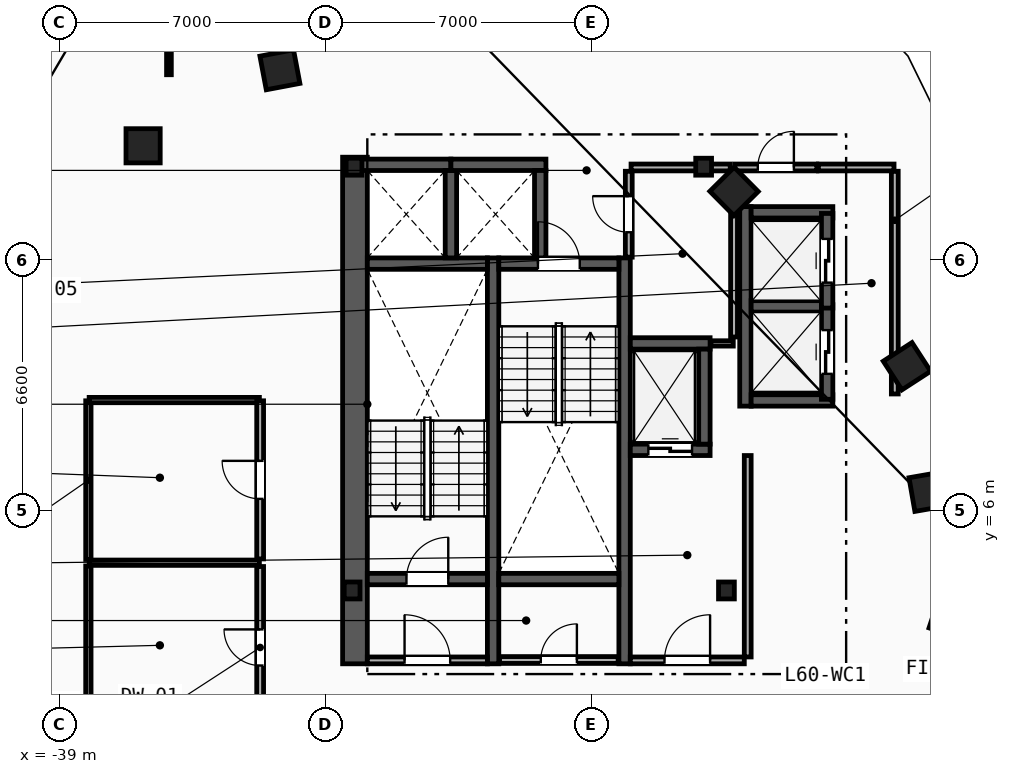
"""IFC4 building model, lengths in metres.
Left out: names, types, materials, properties, quantities, classifications, styles, units other than length and angle.
Written with IfcOpenShell. Run it as: python <this file> out.ifc"""

import sys

from ifc_helpers import new_model, si_unit, direction, frame, frame_2d, origin, origin_2d, place, context, subcontext, project, spatial, rectangle, i_section, extrude, element, fill, save


model = new_model("IFC4")
c1 = context("Model", 3, precision=1e-05, world=origin(), true_north=direction((0.0, 1.0)))
c2 = subcontext(c1, "Body", "Model", "MODEL_VIEW")
j1 = project(units=[si_unit("LENGTHUNIT", "METRE"), si_unit("PLANEANGLEUNIT", "RADIAN")], contexts=[c1])
p1 = place(None, origin())
s1 = spatial("IfcSite", under=j1, at=p1, CompositionType="ELEMENT")
p2 = place(p1, origin())
s2 = spatial("IfcBuilding", under=s1, at=p2, CompositionType="ELEMENT")
p3 = place(p2, frame((0.0, 0.0, 227.8)))
s3 = spatial("IfcBuildingStorey", under=s2, at=p3, CompositionType="ELEMENT", Elevation=227.8)
for number, where, z_axis, x_axis in (
    (1, (-31.3, 3.9, 0.0), (0.0, 0.0, 1.0), (1.0, 0.0, 0.0)),
    (2, (-21.45, 3.9, 0.0), (0.0, 0.0, 1.0), (1.0, 0.0, 0.0)),
    (3, (-22.05, 15.05, 0.0), (0.0, 0.0, 1.0), (1.0, 0.0, 0.0)),
    (4, (-31.25, 15.05, 0.0), (0.0, 0.0, 1.0), (1.0, 0.0, 0.0)),
):
    element("IfcColumn", number, at=place(p3, frame(where, z_axis=z_axis, x_axis=x_axis)), inside=s3, PredefinedType="COLUMN", context=c2, shape_type="SweptSolid", body=[
        extrude(i_section(OverallWidth=0.416, OverallDepth=0.446, WebThickness=0.039, FlangeThickness=0.063, FilletRadius=0.018, at=origin_2d()), origin(), (0.0, 0.0, 1.0), 3.6),
    ])
for number, where, z_axis, x_axis in (
    (5, (-36.8, 15.6, 0.0), (0.0, 0.0, 1.0), (1.0, 0.0, 0.0)),
    (6, (-15.55, 3.2, 0.0), (0.0, 0.0, 1.0), (0.315, 0.949, 0.0)),
    (7, (-16.125, 6.5, 0.0), (0.0, 0.0, 1.0), (-0.172, 0.985, 0.0)),
    (8, (-16.7, 9.8, 0.0), (0.0, 0.0, 1.0), (-0.544, 0.839, 0.0)),
    (9, (-21.25, 14.4, 0.0), (0.0, 0.0, 1.0), (-0.703, 0.711, 0.0)),
    (10, (-33.2, 17.6, 0.0), (0.0, 0.0, 1.0), (-0.983, -0.186, 0.0)),
):
    element("IfcColumn", number, at=place(p3, frame(where, z_axis=z_axis, x_axis=x_axis)), inside=s3, PredefinedType="COLUMN", context=c2, shape_type="SweptSolid", body=[
        extrude(rectangle(XDim=0.9, YDim=0.9, at=origin_2d()), origin(), (0.0, 0.0, 1.0), 3.6),
    ])
p4 = place(p3, frame((-31.225, 1.97, 0.0), z_axis=(0.0, 0.0, 1.0), x_axis=(0.0, 1.0, 0.0)))
e11 = element("IfcWall", 11, at=p4, inside=s3, PredefinedType="SHEAR", context=c2, shape_type="SweptSolid", body=[
    extrude(rectangle(XDim=13.33, YDim=0.65, at=frame_2d((6.665, 0.0))), origin(), (0.0, 0.0, 1.0), 3.34),
])
for number, where, z_axis, x_axis in (
    (12, (-27.59, 1.97, 0.0), (0.0, 0.0, 1.0), (0.0, 1.0, 0.0)),
    (13, (-24.13, 1.97, 0.0), (0.0, 0.0, 1.0), (0.0, 1.0, 0.0)),
):
    element("IfcWall", number, at=place(p3, frame(where, z_axis=z_axis, x_axis=x_axis)), inside=s3, PredefinedType="SHEAR", context=c2, shape_type="SweptSolid", body=[
        extrude(rectangle(XDim=10.68, YDim=0.3, at=frame_2d((5.34, 0.0))), origin(), (0.0, 0.0, 1.0), 3.34),
    ])
p5 = place(p3, frame((-30.9, 4.2, 0.0), z_axis=(0.0, 0.0, 1.0), x_axis=(1.0, 0.0, 0.0)))
e14 = element("IfcWall", 14, at=p5, inside=s3, PredefinedType="SHEAR", context=c2, shape_type="SweptSolid", body=[
    extrude(rectangle(XDim=3.16, YDim=0.3, at=frame_2d((1.58, 0.0))), origin(), (0.0, 0.0, 1.0), 3.34),
])
p6 = place(p5, frame((1.03, 0.0, 0.0)))
e15 = element("IfcOpeningElement", 15, at=p6, cuts=e14, PredefinedType="OPENING", context=c2, shape_type="SweptSolid", body=[
    extrude(rectangle(XDim=1.1, YDim=2.15, at=frame_2d((0.55, 1.075))), frame((0.0, 0.16, 0.0), z_axis=(0.0, -1.0, 0.0), x_axis=(1.0, 0.0, 0.0)), (0.0, 0.0, 1.0), 0.32),
])
p7 = place(p3, frame((-30.9, 12.5, 0.0), z_axis=(0.0, 0.0, 1.0), x_axis=(1.0, 0.0, 0.0)))
e16 = element("IfcWall", 16, at=p7, inside=s3, PredefinedType="SHEAR", context=c2, shape_type="SweptSolid", body=[
    extrude(rectangle(XDim=3.16, YDim=0.3, at=frame_2d((1.58, 0.0))), origin(), (0.0, 0.0, 1.0), 3.34),
])
p8 = place(p3, frame((-27.44, 12.5, 0.0), z_axis=(0.0, 0.0, 1.0), x_axis=(1.0, 0.0, 0.0)))
e17 = element("IfcWall", 17, at=p8, inside=s3, PredefinedType="SHEAR", context=c2, shape_type="SweptSolid", body=[
    extrude(rectangle(XDim=3.16, YDim=0.3, at=frame_2d((1.58, 0.0))), origin(), (0.0, 0.0, 1.0), 3.34),
])
p9 = place(p8, frame((1.03, 0.0, 0.0)))
e18 = element("IfcOpeningElement", 18, at=p9, cuts=e17, PredefinedType="OPENING", context=c2, shape_type="SweptSolid", body=[
    extrude(rectangle(XDim=1.1, YDim=2.15, at=frame_2d((0.55, 1.075))), frame((0.0, 0.16, 0.0), z_axis=(0.0, -1.0, 0.0), x_axis=(1.0, 0.0, 0.0)), (0.0, 0.0, 1.0), 0.32),
])
p10 = place(p3, frame((-27.44, 4.2, 0.0), z_axis=(0.0, 0.0, 1.0), x_axis=(1.0, 0.0, 0.0)))
e19 = element("IfcWall", 19, at=p10, inside=s3, PredefinedType="SHEAR", context=c2, shape_type="SweptSolid", body=[
    extrude(rectangle(XDim=3.16, YDim=0.3, at=frame_2d((1.58, 0.0))), origin(), (0.0, 0.0, 1.0), 3.34),
])
p11 = place(p3, frame((-20.89, 2.15, 0.0), z_axis=(0.0, 0.0, 1.0), x_axis=(0.0, 1.0, 0.0)))
e20 = element("IfcWall", 20, at=p11, inside=s3, PredefinedType="PARTITIONING", context=c2, shape_type="SweptSolid", body=[
    extrude(rectangle(XDim=5.3, YDim=0.18, at=frame_2d((2.65, 0.0))), origin(), (0.0, 0.0, 1.0), 3.34),
])
p12 = place(p3, frame((-23.98, 2.06, 0.0), z_axis=(0.0, 0.0, 1.0), x_axis=(1.0, 0.0, 0.0)))
e21 = element("IfcWall", 21, at=p12, inside=s3, PredefinedType="PARTITIONING", context=c2, shape_type="SweptSolid", body=[
    extrude(rectangle(XDim=3.0, YDim=0.18, at=frame_2d((1.5, 0.0))), origin(), (0.0, 0.0, 1.0), 3.34),
])
p13 = place(p12, frame((0.9, 0.0, 0.0)))
e22 = element("IfcOpeningElement", 22, at=p13, cuts=e21, PredefinedType="OPENING", context=c2, shape_type="SweptSolid", body=[
    extrude(rectangle(XDim=1.2, YDim=2.15, at=frame_2d((0.6, 1.075))), frame((0.0, 0.1, 0.0), z_axis=(0.0, -1.0, 0.0), x_axis=(1.0, 0.0, 0.0)), (0.0, 0.0, 1.0), 0.2),
])
p14 = place(p3, frame((-30.9, 2.06, 0.0), z_axis=(0.0, 0.0, 1.0), x_axis=(1.0, 0.0, 0.0)))
e23 = element("IfcWall", 23, at=p14, inside=s3, PredefinedType="PARTITIONING", context=c2, shape_type="SweptSolid", body=[
    extrude(rectangle(XDim=3.16, YDim=0.18, at=frame_2d((1.58, 0.0))), origin(), (0.0, 0.0, 1.0), 3.34),
])
p15 = place(p14, frame((0.98, 0.0, 0.0)))
e24 = element("IfcOpeningElement", 24, at=p15, cuts=e23, PredefinedType="OPENING", context=c2, shape_type="SweptSolid", body=[
    extrude(rectangle(XDim=1.2, YDim=2.15, at=frame_2d((0.6, 1.075))), frame((0.0, 0.1, 0.0), z_axis=(0.0, -1.0, 0.0), x_axis=(1.0, 0.0, 0.0)), (0.0, 0.0, 1.0), 0.2),
])
p16 = place(p3, frame((-23.98, 7.6, 0.0), z_axis=(0.0, 0.0, 1.0), x_axis=(1.0, 0.0, 0.0)))
e25 = element("IfcWall", 25, at=p16, inside=s3, PredefinedType="SHEAR", context=c2, shape_type="SweptSolid", body=[
    extrude(rectangle(XDim=2.1, YDim=0.3, at=frame_2d((1.05, 0.0))), origin(), (0.0, 0.0, 1.0), 3.34),
])
p17 = place(p16, frame((0.475, 0.0, 0.0)))
e26 = element("IfcOpeningElement", 26, at=p17, cuts=e25, PredefinedType="OPENING", context=c2, shape_type="SweptSolid", body=[
    extrude(rectangle(XDim=1.15, YDim=2.2, at=frame_2d((0.575, 1.1))), frame((0.0, 0.16, 0.0), z_axis=(0.0, -1.0, 0.0), x_axis=(1.0, 0.0, 0.0)), (0.0, 0.0, 1.0), 0.32),
])
p18 = place(p3, frame((-23.98, 10.4, 0.0), z_axis=(0.0, 0.0, 1.0), x_axis=(1.0, 0.0, 0.0)))
e27 = element("IfcWall", 27, at=p18, inside=s3, PredefinedType="SHEAR", context=c2, shape_type="SweptSolid", body=[
    extrude(rectangle(XDim=2.1, YDim=0.3, at=frame_2d((1.05, 0.0))), origin(), (0.0, 0.0, 1.0), 3.34),
])
for number, where, z_axis, x_axis in (
    (28, (-22.03, 7.75, 0.0), (0.0, 0.0, 1.0), (0.0, 1.0, 0.0)),
    (29, (-31.2, 15.1, 0.0), (0.0, 0.0, 1.0), (1.0, 0.0, 0.0)),
):
    element("IfcWall", number, at=place(p3, frame(where, z_axis=z_axis, x_axis=x_axis)), inside=s3, PredefinedType="SHEAR", context=c2, shape_type="SweptSolid", body=[
        extrude(rectangle(XDim=2.5, YDim=0.3, at=frame_2d((1.25, 0.0))), origin(), (0.0, 0.0, 1.0), 3.34),
    ])
p19 = place(p3, frame((-28.7, 12.65, 0.0), z_axis=(0.0, 0.0, 1.0), x_axis=(0.0, 1.0, 0.0)))
e30 = element("IfcWall", 30, at=p19, inside=s3, PredefinedType="SHEAR", context=c2, shape_type="SweptSolid", body=[
    extrude(rectangle(XDim=2.3, YDim=0.3, at=frame_2d((1.15, 0.0))), origin(), (0.0, 0.0, 1.0), 3.34),
])
p20 = place(p3, frame((-28.7, 15.1, 0.0), z_axis=(0.0, 0.0, 1.0), x_axis=(1.0, 0.0, 0.0)))
e31 = element("IfcWall", 31, at=p20, inside=s3, PredefinedType="SHEAR", context=c2, shape_type="SweptSolid", body=[
    extrude(rectangle(XDim=2.5, YDim=0.3, at=frame_2d((1.25, 0.0))), origin(), (0.0, 0.0, 1.0), 3.34),
])
p21 = place(p3, frame((-26.35, 12.65, 0.0), z_axis=(0.0, 0.0, 1.0), x_axis=(0.0, 1.0, 0.0)))
e32 = element("IfcWall", 32, at=p21, inside=s3, PredefinedType="SHEAR", context=c2, shape_type="SweptSolid", body=[
    extrude(rectangle(XDim=2.3, YDim=0.3, at=frame_2d((1.15, 0.0))), origin(), (0.0, 0.0, 1.0), 3.34),
])
p22 = place(p3, frame((-20.95, 8.75, 0.0), z_axis=(0.0, 0.0, 1.0), x_axis=(0.0, 1.0, 0.0)))
e33 = element("IfcWall", 33, at=p22, inside=s3, PredefinedType="SHEAR", context=c2, shape_type="SweptSolid", body=[
    extrude(rectangle(XDim=5.25, YDim=0.3, at=frame_2d((2.625, 0.0))), origin(), (0.0, 0.0, 1.0), 3.34),
])
for number, where, z_axis, x_axis in (
    (34, (-20.8, 8.9, 0.0), (0.0, 0.0, 1.0), (1.0, 0.0, 0.0)),
    (35, (-20.8, 13.85, 0.0), (0.0, 0.0, 1.0), (1.0, 0.0, 0.0)),
):
    element("IfcWall", number, at=place(p3, frame(where, z_axis=z_axis, x_axis=x_axis)), inside=s3, PredefinedType="SHEAR", context=c2, shape_type="SweptSolid", body=[
        extrude(rectangle(XDim=2.15, YDim=0.3, at=frame_2d((1.075, 0.0))), origin(), (0.0, 0.0, 1.0), 3.34),
    ])
p23 = place(p3, frame((-20.8, 11.375, 0.0), z_axis=(0.0, 0.0, 1.0), x_axis=(1.0, 0.0, 0.0)))
e36 = element("IfcWall", 36, at=p23, inside=s3, PredefinedType="SHEAR", context=c2, shape_type="SweptSolid", body=[
    extrude(rectangle(XDim=1.85, YDim=0.3, at=frame_2d((0.925, 0.0))), origin(), (0.0, 0.0, 1.0), 3.34),
])
p24 = place(p3, frame((-18.8, 8.93, 0.0), z_axis=(0.0, 0.0, 1.0), x_axis=(0.0, 1.0, 0.0)))
e37 = element("IfcWall", 37, at=p24, inside=s3, PredefinedType="SHEAR", context=c2, shape_type="SweptSolid", body=[
    extrude(rectangle(XDim=2.49, YDim=0.3, at=frame_2d((1.245, 0.0))), origin(), (0.0, 0.0, 1.0), 3.34),
])
p25 = place(p24, frame((0.67, 0.0, 0.0)))
e38 = element("IfcOpeningElement", 38, at=p25, cuts=e37, PredefinedType="OPENING", context=c2, shape_type="SweptSolid", body=[
    extrude(rectangle(XDim=1.15, YDim=2.2, at=frame_2d((0.575, 1.1))), frame((0.0, 0.16, 0.0), z_axis=(0.0, -1.0, 0.0), x_axis=(1.0, 0.0, 0.0)), (0.0, 0.0, 1.0), 0.32),
])
p26 = place(p3, frame((-18.8, 11.33, 0.0), z_axis=(0.0, 0.0, 1.0), x_axis=(0.0, 1.0, 0.0)))
e39 = element("IfcWall", 39, at=p26, inside=s3, PredefinedType="SHEAR", context=c2, shape_type="SweptSolid", body=[
    extrude(rectangle(XDim=2.49, YDim=0.3, at=frame_2d((1.245, 0.0))), origin(), (0.0, 0.0, 1.0), 3.34),
])
p27 = place(p26, frame((0.67, 0.0, 0.0)))
e40 = element("IfcOpeningElement", 40, at=p27, cuts=e39, PredefinedType="OPENING", context=c2, shape_type="SweptSolid", body=[
    extrude(rectangle(XDim=1.15, YDim=2.2, at=frame_2d((0.575, 1.1))), frame((0.0, 0.16, 0.0), z_axis=(0.0, -1.0, 0.0), x_axis=(1.0, 0.0, 0.0)), (0.0, 0.0, 1.0), 0.32),
])
p28 = place(p3, frame((-17.02, 9.07, 0.0), z_axis=(0.0, 0.0, 1.0), x_axis=(0.0, 1.0, 0.0)))
e41 = element("IfcWall", 41, at=p28, inside=s3, PredefinedType="PARTITIONING", context=c2, shape_type="SweptSolid", body=[
    extrude(rectangle(XDim=5.86, YDim=0.18, at=frame_2d((2.93, 0.0))), origin(), (0.0, 0.0, 1.0), 3.34),
])
p29 = place(p3, frame((-21.23, 15.03, 0.0), z_axis=(0.0, 0.0, 1.0), x_axis=(1.0, 0.0, 0.0)))
e42 = element("IfcWall", 42, at=p29, inside=s3, PredefinedType="PARTITIONING", context=c2, shape_type="SweptSolid", body=[
    extrude(rectangle(XDim=2.16, YDim=0.18, at=frame_2d((1.08, 0.0))), origin(), (0.0, 0.0, 1.0), 3.34),
])
p30 = place(p29, frame((0.605, 0.0, 0.0)))
e43 = element("IfcOpeningElement", 43, at=p30, cuts=e42, PredefinedType="OPENING", context=c2, shape_type="SweptSolid", body=[
    extrude(rectangle(XDim=0.95, YDim=2.1, at=frame_2d((0.475, 1.05))), frame((0.0, 0.1, 0.0), z_axis=(0.0, -1.0, 0.0), x_axis=(1.0, 0.0, 0.0)), (0.0, 0.0, 1.0), 0.2),
])
p31 = place(p3, frame((-19.03, 15.03, 0.0), z_axis=(0.0, 0.0, 1.0), x_axis=(1.0, 0.0, 0.0)))
e44 = element("IfcWall", 44, at=p31, inside=s3, PredefinedType="PARTITIONING", context=c2, shape_type="SweptSolid", body=[
    extrude(rectangle(XDim=1.99, YDim=0.18, at=frame_2d((0.995, 0.0))), origin(), (0.0, 0.0, 1.0), 3.34),
])
p32 = place(p3, frame((-21.86, 10.4, 0.0), z_axis=(0.0, 0.0, 1.0), x_axis=(1.0, 0.0, 0.0)))
e45 = element("IfcWall", 45, at=p32, inside=s3, PredefinedType="PARTITIONING", context=c2, shape_type="SweptSolid", body=[
    extrude(rectangle(XDim=0.59, YDim=0.14, at=frame_2d((0.295, 0.0))), origin(), (0.0, 0.0, 1.0), 3.34),
])
p33 = place(p3, frame((-21.25, 10.57, 0.0), z_axis=(0.0, 0.0, 1.0), x_axis=(0.0, 1.0, 0.0)))
e46 = element("IfcWall", 46, at=p33, inside=s3, PredefinedType="PARTITIONING", context=c2, shape_type="SweptSolid", body=[
    extrude(rectangle(XDim=4.36, YDim=0.18, at=frame_2d((2.18, 0.0))), origin(), (0.0, 0.0, 1.0), 3.34),
])
p34 = place(p3, frame((-23.96, 15.03, 0.0), z_axis=(0.0, 0.0, 1.0), x_axis=(1.0, 0.0, 0.0)))
e47 = element("IfcWall", 47, at=p34, inside=s3, PredefinedType="PARTITIONING", context=c2, shape_type="SweptSolid", body=[
    extrude(rectangle(XDim=2.61, YDim=0.18, at=frame_2d((1.305, 0.0))), origin(), (0.0, 0.0, 1.0), 2.413),
])
p35 = place(p3, frame((-27.42, 2.07, 0.0), z_axis=(0.0, 0.0, 1.0), x_axis=(1.0, 0.0, 0.0)))
e48 = element("IfcWall", 48, at=p35, inside=s3, PredefinedType="PARTITIONING", context=c2, shape_type="SweptSolid", body=[
    extrude(rectangle(XDim=3.12, YDim=0.18, at=frame_2d((1.56, 0.0))), origin(), (0.0, 0.0, 1.0), 3.34),
])
p36 = place(p35, frame((1.085, 0.0, 0.0)))
e49 = element("IfcOpeningElement", 49, at=p36, cuts=e48, PredefinedType="OPENING", context=c2, shape_type="SweptSolid", body=[
    extrude(rectangle(XDim=0.95, YDim=2.1, at=frame_2d((0.475, 1.05))), frame((0.0, 0.1, 0.0), z_axis=(0.0, -1.0, 0.0), x_axis=(1.0, 0.0, 0.0)), (0.0, 0.0, 1.0), 0.2),
])
p37 = place(p3, frame((-24.02, 12.67, 0.0), z_axis=(0.0, 0.0, 1.0), x_axis=(0.0, 1.0, 0.0)))
e50 = element("IfcWall", 50, at=p37, inside=s3, PredefinedType="PARTITIONING", context=c2, shape_type="SweptSolid", body=[
    extrude(rectangle(XDim=2.26, YDim=0.18, at=frame_2d((1.13, 0.0))), origin(), (0.0, 0.0, 1.0), 3.34),
])
p38 = place(p37, frame((0.655, 0.0, 0.0)))
e51 = element("IfcOpeningElement", 51, at=p38, cuts=e50, PredefinedType="OPENING", context=c2, shape_type="SweptSolid", body=[
    extrude(rectangle(XDim=0.95, YDim=2.1, at=frame_2d((0.475, 1.05))), frame((0.0, 0.1, 0.0), z_axis=(0.0, -1.0, 0.0), x_axis=(1.0, 0.0, 0.0)), (0.0, 0.0, 1.0), 0.2),
])
p39 = place(p3, frame((-38.24, 0.27, 0.0), z_axis=(0.0, 0.0, 1.0), x_axis=(0.0, 1.0, 0.0)))
e52 = element("IfcWall", 52, at=p39, inside=s3, PredefinedType="PARTITIONING", context=c2, shape_type="SweptSolid", body=[
    extrude(rectangle(XDim=4.275, YDim=0.14, at=frame_2d((2.137, 0.0))), origin(), (0.0, 0.0, 1.0), 3.34),
])
p40 = place(p3, frame((-38.24, 4.715, 0.0), z_axis=(0.0, 0.0, 1.0), x_axis=(0.0, 1.0, 0.0)))
e53 = element("IfcWall", 53, at=p40, inside=s3, PredefinedType="PARTITIONING", context=c2, shape_type="SweptSolid", body=[
    extrude(rectangle(XDim=4.175, YDim=0.14, at=frame_2d((2.087, 0.0))), origin(), (0.0, 0.0, 1.0), 3.34),
])
for number, where, z_axis, x_axis in (
    (54, (-38.22, 4.63, 0.0), (0.0, 0.0, 1.0), (1.0, 0.0, 0.0)),
    (55, (-38.22, 8.91, 0.0), (0.0, 0.0, 1.0), (1.0, 0.0, 0.0)),
):
    element("IfcWall", number, at=place(p3, frame(where, z_axis=z_axis, x_axis=x_axis)), inside=s3, PredefinedType="PARTITIONING", context=c2, shape_type="SweptSolid", body=[
        extrude(rectangle(XDim=4.48, YDim=0.14, at=frame_2d((2.24, 0.0))), origin(), (0.0, 0.0, 1.0), 3.34),
    ])
p41 = place(p3, frame((-33.72, 0.27, 0.0), z_axis=(0.0, 0.0, 1.0), x_axis=(0.0, 1.0, 0.0)))
e56 = element("IfcWall", 56, at=p41, inside=s3, PredefinedType="PARTITIONING", context=c2, shape_type="SweptSolid", body=[
    extrude(rectangle(XDim=4.26, YDim=0.18, at=frame_2d((2.13, 0.0))), origin(), (0.0, 0.0, 1.0), 3.34),
])
p42 = place(p41, frame((1.655, 0.0, 0.0)))
e57 = element("IfcOpeningElement", 57, at=p42, cuts=e56, PredefinedType="OPENING", context=c2, shape_type="SweptSolid", body=[
    extrude(rectangle(XDim=0.95, YDim=2.1, at=frame_2d((0.475, 1.05))), frame((0.0, 0.1, 0.0), z_axis=(0.0, -1.0, 0.0), x_axis=(1.0, 0.0, 0.0)), (0.0, 0.0, 1.0), 0.2),
])
p43 = place(p3, frame((-33.72, 4.73, 0.0), z_axis=(0.0, 0.0, 1.0), x_axis=(0.0, 1.0, 0.0)))
e58 = element("IfcWall", 58, at=p43, inside=s3, PredefinedType="PARTITIONING", context=c2, shape_type="SweptSolid", body=[
    extrude(rectangle(XDim=4.16, YDim=0.18, at=frame_2d((2.08, 0.0))), origin(), (0.0, 0.0, 1.0), 3.34),
])
p44 = place(p43, frame((1.58, 0.0, 0.0)))
e59 = element("IfcOpeningElement", 59, at=p44, cuts=e58, PredefinedType="OPENING", context=c2, shape_type="SweptSolid", body=[
    extrude(rectangle(XDim=1.0, YDim=2.15, at=frame_2d((0.5, 1.075))), frame((0.0, 0.1, 0.0), z_axis=(0.0, -1.0, 0.0), x_axis=(1.0, 0.0, 0.0)), (0.0, 0.0, 1.0), 0.2),
])
p45 = place(p3, frame((-36.12, 17.47, 0.0), z_axis=(0.0, 0.0, 1.0), x_axis=(0.0, 1.0, 0.0)))
e60 = element("IfcWall", 60, at=p45, inside=s3, PredefinedType="PARTITIONING", context=c2, shape_type="SweptSolid", body=[
    extrude(rectangle(XDim=7.344, YDim=0.125, at=frame_2d((3.672, 0.0))), origin(), (0.0, 0.0, 1.0), 3.34),
])
p46 = place(p6, origin())
e61 = element("IfcDoor", 61, at=p46, inside=s3, OperationType="SINGLE_SWING_RIGHT", PredefinedType="DOOR", context=c2, shape_type="SweptSolid", body=[
    extrude(rectangle(XDim=1.1, YDim=2.15, at=frame_2d((0.55, 1.075))), frame((0.0, 0.025, 0.0), z_axis=(0.0, -1.0, 0.0), x_axis=(1.0, 0.0, 0.0)), (0.0, 0.0, 1.0), 0.05),
])
fill(e15, e61)
p47 = place(p9, origin())
e62 = element("IfcDoor", 62, at=p47, inside=s3, OperationType="SINGLE_SWING_LEFT", PredefinedType="DOOR", context=c2, shape_type="SweptSolid", body=[
    extrude(rectangle(XDim=1.1, YDim=2.15, at=frame_2d((0.55, 1.075))), frame((0.0, 0.025, 0.0), z_axis=(0.0, -1.0, 0.0), x_axis=(1.0, 0.0, 0.0)), (0.0, 0.0, 1.0), 0.05),
])
fill(e18, e62)
p48 = place(p13, origin())
e63 = element("IfcDoor", 63, at=p48, inside=s3, OperationType="SINGLE_SWING_RIGHT", PredefinedType="DOOR", context=c2, shape_type="SweptSolid", body=[
    extrude(rectangle(XDim=1.2, YDim=2.15, at=frame_2d((0.6, 1.075))), frame((0.0, 0.025, 0.0), z_axis=(0.0, -1.0, 0.0), x_axis=(1.0, 0.0, 0.0)), (0.0, 0.0, 1.0), 0.05),
])
fill(e22, e63)
p49 = place(p15, origin())
e64 = element("IfcDoor", 64, at=p49, inside=s3, OperationType="SINGLE_SWING_LEFT", PredefinedType="DOOR", context=c2, shape_type="SweptSolid", body=[
    extrude(rectangle(XDim=1.2, YDim=2.15, at=frame_2d((0.6, 1.075))), frame((0.0, 0.025, 0.0), z_axis=(0.0, -1.0, 0.0), x_axis=(1.0, 0.0, 0.0)), (0.0, 0.0, 1.0), 0.05),
])
fill(e24, e64)
p50 = place(p17, origin())
e65 = element("IfcDoor", 65, at=p50, inside=s3, OperationType="SLIDING_TO_LEFT", PredefinedType="TRAPDOOR", context=c2, shape_type="SweptSolid", body=[
    extrude(rectangle(XDim=1.15, YDim=2.2, at=frame_2d((0.575, 1.1))), frame((0.0, 0.025, 0.0), z_axis=(0.0, -1.0, 0.0), x_axis=(1.0, 0.0, 0.0)), (0.0, 0.0, 1.0), 0.05),
])
fill(e26, e65)
p51 = place(p25, origin())
e66 = element("IfcDoor", 66, at=p51, inside=s3, OperationType="SLIDING_TO_LEFT", PredefinedType="TRAPDOOR", context=c2, shape_type="SweptSolid", body=[
    extrude(rectangle(XDim=1.15, YDim=2.2, at=frame_2d((0.575, 1.1))), frame((0.0, 0.025, 0.0), z_axis=(0.0, -1.0, 0.0), x_axis=(1.0, 0.0, 0.0)), (0.0, 0.0, 1.0), 0.05),
])
fill(e38, e66)
p52 = place(p27, origin())
e67 = element("IfcDoor", 67, at=p52, inside=s3, OperationType="SLIDING_TO_LEFT", PredefinedType="TRAPDOOR", context=c2, shape_type="SweptSolid", body=[
    extrude(rectangle(XDim=1.15, YDim=2.2, at=frame_2d((0.575, 1.1))), frame((0.0, 0.025, 0.0), z_axis=(0.0, -1.0, 0.0), x_axis=(1.0, 0.0, 0.0)), (0.0, 0.0, 1.0), 0.05),
])
fill(e40, e67)
p53 = place(p42, origin())
e68 = element("IfcDoor", 68, at=p53, inside=s3, OperationType="SINGLE_SWING_RIGHT", PredefinedType="DOOR", context=c2, shape_type="SweptSolid", body=[
    extrude(rectangle(XDim=0.95, YDim=2.1, at=frame_2d((0.475, 1.05))), frame((0.0, 0.025, 0.0), z_axis=(0.0, -1.0, 0.0), x_axis=(1.0, 0.0, 0.0)), (0.0, 0.0, 1.0), 0.05),
])
fill(e57, e68)
p54 = place(p44, origin())
e69 = element("IfcDoor", 69, at=p54, inside=s3, OperationType="SINGLE_SWING_RIGHT", PredefinedType="DOOR", context=c2, shape_type="SweptSolid", body=[
    extrude(rectangle(XDim=1.0, YDim=2.15, at=frame_2d((0.5, 1.075))), frame((0.0, 0.025, 0.0), z_axis=(0.0, -1.0, 0.0), x_axis=(1.0, 0.0, 0.0)), (0.0, 0.0, 1.0), 0.05),
])
fill(e59, e69)
p55 = place(p36, origin())
e70 = element("IfcDoor", 70, at=p55, inside=s3, OperationType="SINGLE_SWING_RIGHT", PredefinedType="DOOR", context=c2, shape_type="SweptSolid", body=[
    extrude(rectangle(XDim=0.95, YDim=2.1, at=frame_2d((0.475, 1.05))), frame((0.0, 0.025, 0.0), z_axis=(0.0, -1.0, 0.0), x_axis=(1.0, 0.0, 0.0)), (0.0, 0.0, 1.0), 0.05),
])
fill(e49, e70)
p56 = place(p38, origin())
e71 = element("IfcDoor", 71, at=p56, inside=s3, OperationType="SINGLE_SWING_RIGHT", PredefinedType="DOOR", context=c2, shape_type="SweptSolid", body=[
    extrude(rectangle(XDim=0.95, YDim=2.1, at=frame_2d((0.475, 1.05))), frame((0.0, 0.025, 0.0), z_axis=(0.0, -1.0, 0.0), x_axis=(1.0, 0.0, 0.0)), (0.0, 0.0, 1.0), 0.05),
])
fill(e51, e71)
p57 = place(p30, origin())
e72 = element("IfcDoor", 72, at=p57, inside=s3, OperationType="SINGLE_SWING_RIGHT", PredefinedType="DOOR", context=c2, shape_type="SweptSolid", body=[
    extrude(rectangle(XDim=0.95, YDim=2.1, at=frame_2d((0.475, 1.05))), frame((0.0, 0.025, 0.0), z_axis=(0.0, -1.0, 0.0), x_axis=(1.0, 0.0, 0.0)), (0.0, 0.0, 1.0), 0.05),
])
fill(e43, e72)
save(model, sys.argv[1])
